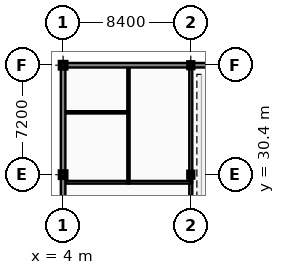
"""IFC4 building model, lengths in metres.
Left out: names, types, materials, properties, quantities, classifications, styles, units other than length and angle.
Written with IfcOpenShell. Run it as: python <this file> out.ifc"""

import sys

from ifc_helpers import new_model, si_unit, direction, frame, frame_2d, origin, origin_2d, place, context, subcontext, project, spatial, rectangle, i_section, extrude, element, fill, save


model = new_model("IFC4")
c1 = context("Model", 3, precision=1e-05, world=origin(), true_north=direction((0.0, 1.0)))
c2 = subcontext(c1, "Body", "Model", "MODEL_VIEW")
j1 = project(units=[si_unit("LENGTHUNIT", "METRE"), si_unit("PLANEANGLEUNIT", "RADIAN")], contexts=[c1])
p1 = place(None, origin())
s1 = spatial("IfcSite", under=j1, at=p1, CompositionType="ELEMENT")
p2 = place(p1, origin())
s2 = spatial("IfcBuilding", under=s1, at=p2, CompositionType="ELEMENT")
p3 = place(p2, frame((0.0, 0.0, 5.4)))
s3 = spatial("IfcBuildingStorey", under=s2, at=p3, CompositionType="ELEMENT", Elevation=5.4)
for number, where, z_axis, x_axis in (
    (1, (4.0, 30.4, 0.0), (0.0, 0.0, 1.0), (1.0, 0.0, 0.0)),
    (2, (4.0, 37.6, 0.0), (0.0, 0.0, 1.0), (1.0, 0.0, 0.0)),
):
    element("IfcColumn", number, at=place(p3, frame(where, z_axis=z_axis, x_axis=x_axis)), inside=s3, PredefinedType="COLUMN", context=c2, shape_type="SweptSolid", body=[
        extrude(rectangle(XDim=0.4, YDim=0.4, at=origin_2d()), origin(), (0.0, 0.0, 1.0), 4.2),
    ])
for number, where, z_axis, x_axis in (
    (3, (12.4, 30.4, 0.0), (0.0, 0.0, 1.0), (1.0, 0.0, 0.0)),
    (4, (12.4, 37.6, 0.0), (0.0, 0.0, 1.0), (1.0, 0.0, 0.0)),
):
    element("IfcColumn", number, at=place(p3, frame(where, z_axis=z_axis, x_axis=x_axis)), inside=s3, PredefinedType="COLUMN", context=c2, shape_type="SweptSolid", body=[
        extrude(i_section(OverallWidth=0.3, OverallDepth=0.36, WebThickness=0.012, FlangeThickness=0.022, at=origin_2d()), origin(), (0.0, 0.0, 1.0), 4.2),
    ])
p4 = place(p3, frame((12.4, 8.96, 0.0), z_axis=(0.0, 0.0, 1.0), x_axis=(0.0, 1.0, 0.0)))
e5 = element("IfcWall", 5, at=p4, inside=s3, PredefinedType="PARTITIONING", context=c2, shape_type="SweptSolid", body=[
    extrude(rectangle(XDim=20.94, YDim=0.2, at=frame_2d((10.47, 0.0))), origin(), (0.0, 0.0, 1.0), 3.35),
])
p5 = place(p4, frame((8.613, 0.0, -0.01)))
e6 = element("IfcOpeningElement", 6, at=p5, cuts=e5, PredefinedType="OPENING", context=c2, shape_type="SweptSolid", body=[
    extrude(rectangle(XDim=1.8, YDim=2.26, at=frame_2d((0.9, 1.13))), frame((0.0, 0.11, 0.0), z_axis=(0.0, -1.0, 0.0), x_axis=(1.0, 0.0, 0.0)), (0.0, 0.0, 1.0), 0.22),
])
p6 = place(p3, frame((12.4, 29.9, 0.0), z_axis=(0.0, 0.0, 1.0), x_axis=(0.0, 1.0, 0.0)))
e7 = element("IfcWall", 7, at=p6, inside=s3, PredefinedType="PARTITIONING", context=c2, shape_type="SweptSolid", body=[
    extrude(rectangle(XDim=7.56, YDim=0.2, at=frame_2d((3.78, 0.0))), origin(), (0.0, 0.0, 1.0), 3.23),
])
p7 = place(p3, frame((4.16, 29.9, 0.0), z_axis=(0.0, 0.0, 1.0), x_axis=(1.0, 0.0, 0.0)))
e8 = element("IfcWall", 8, at=p7, inside=s3, PredefinedType="PARTITIONING", context=c2, shape_type="SweptSolid", body=[
    extrude(rectangle(XDim=4.14, YDim=0.18, at=frame_2d((2.07, 0.0))), origin(), (0.0, 0.0, 1.0), 3.5),
])
p8 = place(p7, frame((1.57, 0.0, -0.01)))
e9 = element("IfcOpeningElement", 9, at=p8, cuts=e8, PredefinedType="OPENING", context=c2, shape_type="SweptSolid", body=[
    extrude(rectangle(XDim=1.0, YDim=2.16, at=frame_2d((0.5, 1.08))), frame((0.0, 0.1, 0.0), z_axis=(0.0, -1.0, 0.0), x_axis=(1.0, 0.0, 0.0)), (0.0, 0.0, 1.0), 0.2),
])
p9 = place(p3, frame((8.3, 29.9, 0.0), z_axis=(0.0, 0.0, 1.0), x_axis=(1.0, 0.0, 0.0)))
e10 = element("IfcWall", 10, at=p9, inside=s3, PredefinedType="PARTITIONING", context=c2, shape_type="SweptSolid", body=[
    extrude(rectangle(XDim=4.1, YDim=0.18, at=frame_2d((2.05, 0.0))), origin(), (0.0, 0.0, 1.0), 3.35),
])
p10 = place(p9, frame((1.55, 0.0, -0.01)))
e11 = element("IfcOpeningElement", 11, at=p10, cuts=e10, PredefinedType="OPENING", context=c2, shape_type="SweptSolid", body=[
    extrude(rectangle(XDim=1.0, YDim=2.16, at=frame_2d((0.5, 1.08))), frame((0.0, 0.1, 0.0), z_axis=(0.0, -1.0, 0.0), x_axis=(1.0, 0.0, 0.0)), (0.0, 0.0, 1.0), 0.2),
])
p11 = place(p3, frame((8.3, 29.9, 0.0), z_axis=(0.0, 0.0, 1.0), x_axis=(0.0, 1.0, 0.0)))
e12 = element("IfcWall", 12, at=p11, inside=s3, PredefinedType="PARTITIONING", context=c2, shape_type="SweptSolid", body=[
    extrude(rectangle(XDim=7.56, YDim=0.15, at=frame_2d((3.78, 0.0))), origin(), (0.0, 0.0, 1.0), 3.23),
])
p12 = place(p3, frame((4.16, 34.5, 0.0), z_axis=(0.0, 0.0, 1.0), x_axis=(1.0, 0.0, 0.0)))
e13 = element("IfcWall", 13, at=p12, inside=s3, PredefinedType="PARTITIONING", context=c2, shape_type="SweptSolid", body=[
    extrude(rectangle(XDim=4.14, YDim=0.15, at=frame_2d((2.07, 0.0))), origin(), (0.0, 0.0, 1.0), 3.5),
])
p13 = place(p12, frame((1.595, 0.0, -0.01)))
e14 = element("IfcOpeningElement", 14, at=p13, cuts=e13, PredefinedType="OPENING", context=c2, shape_type="SweptSolid", body=[
    extrude(rectangle(XDim=0.95, YDim=2.16, at=frame_2d((0.475, 1.08))), frame((0.0, 0.085, 0.0), z_axis=(0.0, -1.0, 0.0), x_axis=(1.0, 0.0, 0.0)), (0.0, 0.0, 1.0), 0.17),
])
p14 = place(p3, frame((12.4, 37.6, 0.0), z_axis=(0.0, 0.0, 1.0), x_axis=(-1.0, 0.0, 0.0)))
e15 = element("IfcWall", 15, at=p14, inside=s3, PredefinedType="SOLIDWALL", context=c2, shape_type="SweptSolid", body=[
    extrude(rectangle(XDim=8.4, YDim=0.3, at=frame_2d((4.2, 0.0))), origin(), (0.0, 0.0, 1.0), 3.35),
])
p15 = place(p14, frame((0.46, 0.0, 0.85)))
e16 = element("IfcOpeningElement", 16, at=p15, cuts=e15, PredefinedType="OPENING", context=c2, shape_type="SweptSolid", body=[
    extrude(rectangle(XDim=0.9, YDim=2.15, at=frame_2d((0.45, 1.075))), frame((0.0, 0.16, 0.0), z_axis=(0.0, -1.0, 0.0), x_axis=(1.0, 0.0, 0.0)), (0.0, 0.0, 1.0), 0.32),
])
p16 = place(p14, frame((6.86, 0.0, 0.85)))
e17 = element("IfcOpeningElement", 17, at=p16, cuts=e15, PredefinedType="OPENING", context=c2, shape_type="SweptSolid", body=[
    extrude(rectangle(XDim=0.9, YDim=2.15, at=frame_2d((0.45, 1.075))), frame((0.0, 0.16, 0.0), z_axis=(0.0, -1.0, 0.0), x_axis=(1.0, 0.0, 0.0)), (0.0, 0.0, 1.0), 0.32),
])
p17 = place(p3, frame((20.8, 37.6, 0.0), z_axis=(0.0, 0.0, 1.0), x_axis=(-1.0, 0.0, 0.0)))
e18 = element("IfcWall", 18, at=p17, inside=s3, PredefinedType="SOLIDWALL", context=c2, shape_type="SweptSolid", body=[
    extrude(rectangle(XDim=8.4, YDim=0.3, at=frame_2d((4.2, 0.0))), origin(), (0.0, 0.0, 1.0), 3.35),
])
p18 = place(p17, frame((0.46, 0.0, 0.85)))
e19 = element("IfcOpeningElement", 19, at=p18, cuts=e18, PredefinedType="OPENING", context=c2, shape_type="SweptSolid", body=[
    extrude(rectangle(XDim=0.9, YDim=2.15, at=frame_2d((0.45, 1.075))), frame((0.0, 0.16, 0.0), z_axis=(0.0, -1.0, 0.0), x_axis=(1.0, 0.0, 0.0)), (0.0, 0.0, 1.0), 0.32),
])
p19 = place(p17, frame((6.86, 0.0, 0.85)))
e20 = element("IfcOpeningElement", 20, at=p19, cuts=e18, PredefinedType="OPENING", context=c2, shape_type="SweptSolid", body=[
    extrude(rectangle(XDim=0.9, YDim=2.15, at=frame_2d((0.45, 1.075))), frame((0.0, 0.16, 0.0), z_axis=(0.0, -1.0, 0.0), x_axis=(1.0, 0.0, 0.0)), (0.0, 0.0, 1.0), 0.32),
])
p20 = place(p3, frame((4.0, 30.4, 0.0), z_axis=(0.0, 0.0, 1.0), x_axis=(0.0, -1.0, 0.0)))
e21 = element("IfcWall", 21, at=p20, inside=s3, PredefinedType="SOLIDWALL", context=c2, shape_type="SweptSolid", body=[
    extrude(rectangle(XDim=7.2, YDim=0.3, at=frame_2d((3.6, 0.0))), origin(), (0.0, 0.0, 1.0), 3.23),
])
p21 = place(p20, frame((0.86, 0.0, 0.85)))
e22 = element("IfcOpeningElement", 22, at=p21, cuts=e21, PredefinedType="OPENING", context=c2, shape_type="SweptSolid", body=[
    extrude(rectangle(XDim=0.9, YDim=2.15, at=frame_2d((0.45, 1.075))), frame((0.0, 0.16, 0.0), z_axis=(0.0, -1.0, 0.0), x_axis=(1.0, 0.0, 0.0)), (0.0, 0.0, 1.0), 0.32),
])
p22 = place(p20, frame((5.66, 0.0, 0.85)))
e23 = element("IfcOpeningElement", 23, at=p22, cuts=e21, PredefinedType="OPENING", context=c2, shape_type="SweptSolid", body=[
    extrude(rectangle(XDim=0.9, YDim=2.15, at=frame_2d((0.45, 1.075))), frame((0.0, 0.16, 0.0), z_axis=(0.0, -1.0, 0.0), x_axis=(1.0, 0.0, 0.0)), (0.0, 0.0, 1.0), 0.32),
])
p23 = place(p3, frame((4.0, 37.6, 0.0), z_axis=(0.0, 0.0, 1.0), x_axis=(0.0, -1.0, 0.0)))
e24 = element("IfcWall", 24, at=p23, inside=s3, PredefinedType="SOLIDWALL", context=c2, shape_type="SweptSolid", body=[
    extrude(rectangle(XDim=7.2, YDim=0.3, at=frame_2d((3.6, 0.0))), origin(), (0.0, 0.0, 1.0), 3.23),
])
p24 = place(p23, frame((0.46, 0.0, 0.85)))
e25 = element("IfcOpeningElement", 25, at=p24, cuts=e24, PredefinedType="OPENING", context=c2, shape_type="SweptSolid", body=[
    extrude(rectangle(XDim=0.9, YDim=2.15, at=frame_2d((0.45, 1.075))), frame((0.0, 0.16, 0.0), z_axis=(0.0, -1.0, 0.0), x_axis=(1.0, 0.0, 0.0)), (0.0, 0.0, 1.0), 0.32),
])
p25 = place(p23, frame((5.66, 0.0, 0.85)))
e26 = element("IfcOpeningElement", 26, at=p25, cuts=e24, PredefinedType="OPENING", context=c2, shape_type="SweptSolid", body=[
    extrude(rectangle(XDim=0.9, YDim=2.15, at=frame_2d((0.45, 1.075))), frame((0.0, 0.16, 0.0), z_axis=(0.0, -1.0, 0.0), x_axis=(1.0, 0.0, 0.0)), (0.0, 0.0, 1.0), 0.32),
])
p26 = place(p8, frame((0.0, 0.0, 0.01)))
e27 = element("IfcDoor", 27, at=p26, inside=s3, OperationType="SINGLE_SWING_LEFT", PredefinedType="DOOR", context=c2, shape_type="SweptSolid", body=[
    extrude(rectangle(XDim=1.0, YDim=2.15, at=frame_2d((0.5, 1.075))), frame((0.0, 0.025, 0.0), z_axis=(0.0, -1.0, 0.0), x_axis=(1.0, 0.0, 0.0)), (0.0, 0.0, 1.0), 0.05),
])
fill(e9, e27)
p27 = place(p10, frame((0.0, 0.0, 0.01)))
e28 = element("IfcDoor", 28, at=p27, inside=s3, OperationType="SINGLE_SWING_RIGHT", PredefinedType="DOOR", context=c2, shape_type="SweptSolid", body=[
    extrude(rectangle(XDim=1.0, YDim=2.15, at=frame_2d((0.5, 1.075))), frame((0.0, 0.025, 0.0), z_axis=(0.0, -1.0, 0.0), x_axis=(1.0, 0.0, 0.0)), (0.0, 0.0, 1.0), 0.05),
])
fill(e11, e28)
p28 = place(p13, frame((0.95, 0.0, 0.01), z_axis=(0.0, 0.0, 1.0), x_axis=(-1.0, 0.0, 0.0)))
e29 = element("IfcDoor", 29, at=p28, inside=s3, OperationType="SINGLE_SWING_LEFT", PredefinedType="DOOR", context=c2, shape_type="SweptSolid", body=[
    extrude(rectangle(XDim=0.95, YDim=2.15, at=frame_2d((0.475, 1.075))), frame((0.0, 0.025, 0.0), z_axis=(0.0, -1.0, 0.0), x_axis=(1.0, 0.0, 0.0)), (0.0, 0.0, 1.0), 0.05),
])
fill(e14, e29)
p29 = place(p15, origin())
e30 = element("IfcWindow", 30, at=p29, inside=s3, PartitioningType="SINGLE_PANEL", PredefinedType="WINDOW", context=c2, shape_type="SweptSolid", body=[
    extrude(rectangle(XDim=0.9, YDim=2.15, at=frame_2d((0.45, 1.075))), frame((0.0, 0.03, 0.0), z_axis=(0.0, -1.0, 0.0), x_axis=(1.0, 0.0, 0.0)), (0.0, 0.0, 1.0), 0.06),
])
fill(e16, e30)
p30 = place(p16, origin())
e31 = element("IfcWindow", 31, at=p30, inside=s3, PartitioningType="SINGLE_PANEL", PredefinedType="WINDOW", context=c2, shape_type="SweptSolid", body=[
    extrude(rectangle(XDim=0.9, YDim=2.15, at=frame_2d((0.45, 1.075))), frame((0.0, 0.03, 0.0), z_axis=(0.0, -1.0, 0.0), x_axis=(1.0, 0.0, 0.0)), (0.0, 0.0, 1.0), 0.06),
])
fill(e17, e31)
p31 = place(p19, origin())
e32 = element("IfcWindow", 32, at=p31, inside=s3, PartitioningType="SINGLE_PANEL", PredefinedType="WINDOW", context=c2, shape_type="SweptSolid", body=[
    extrude(rectangle(XDim=0.9, YDim=2.15, at=frame_2d((0.45, 1.075))), frame((0.0, 0.03, 0.0), z_axis=(0.0, -1.0, 0.0), x_axis=(1.0, 0.0, 0.0)), (0.0, 0.0, 1.0), 0.06),
])
fill(e20, e32)
p32 = place(p21, origin())
e33 = element("IfcWindow", 33, at=p32, inside=s3, PartitioningType="SINGLE_PANEL", PredefinedType="WINDOW", context=c2, shape_type="SweptSolid", body=[
    extrude(rectangle(XDim=0.9, YDim=2.15, at=frame_2d((0.45, 1.075))), frame((0.0, 0.03, 0.0), z_axis=(0.0, -1.0, 0.0), x_axis=(1.0, 0.0, 0.0)), (0.0, 0.0, 1.0), 0.06),
])
fill(e22, e33)
p33 = place(p24, origin())
e34 = element("IfcWindow", 34, at=p33, inside=s3, PartitioningType="SINGLE_PANEL", PredefinedType="WINDOW", context=c2, shape_type="SweptSolid", body=[
    extrude(rectangle(XDim=0.9, YDim=2.15, at=frame_2d((0.45, 1.075))), frame((0.0, 0.03, 0.0), z_axis=(0.0, -1.0, 0.0), x_axis=(1.0, 0.0, 0.0)), (0.0, 0.0, 1.0), 0.06),
])
fill(e25, e34)
p34 = place(p25, origin())
e35 = element("IfcWindow", 35, at=p34, inside=s3, PartitioningType="SINGLE_PANEL", PredefinedType="WINDOW", context=c2, shape_type="SweptSolid", body=[
    extrude(rectangle(XDim=0.9, YDim=2.15, at=frame_2d((0.45, 1.075))), frame((0.0, 0.03, 0.0), z_axis=(0.0, -1.0, 0.0), x_axis=(1.0, 0.0, 0.0)), (0.0, 0.0, 1.0), 0.06),
])
fill(e26, e35)
save(model, sys.argv[1])
